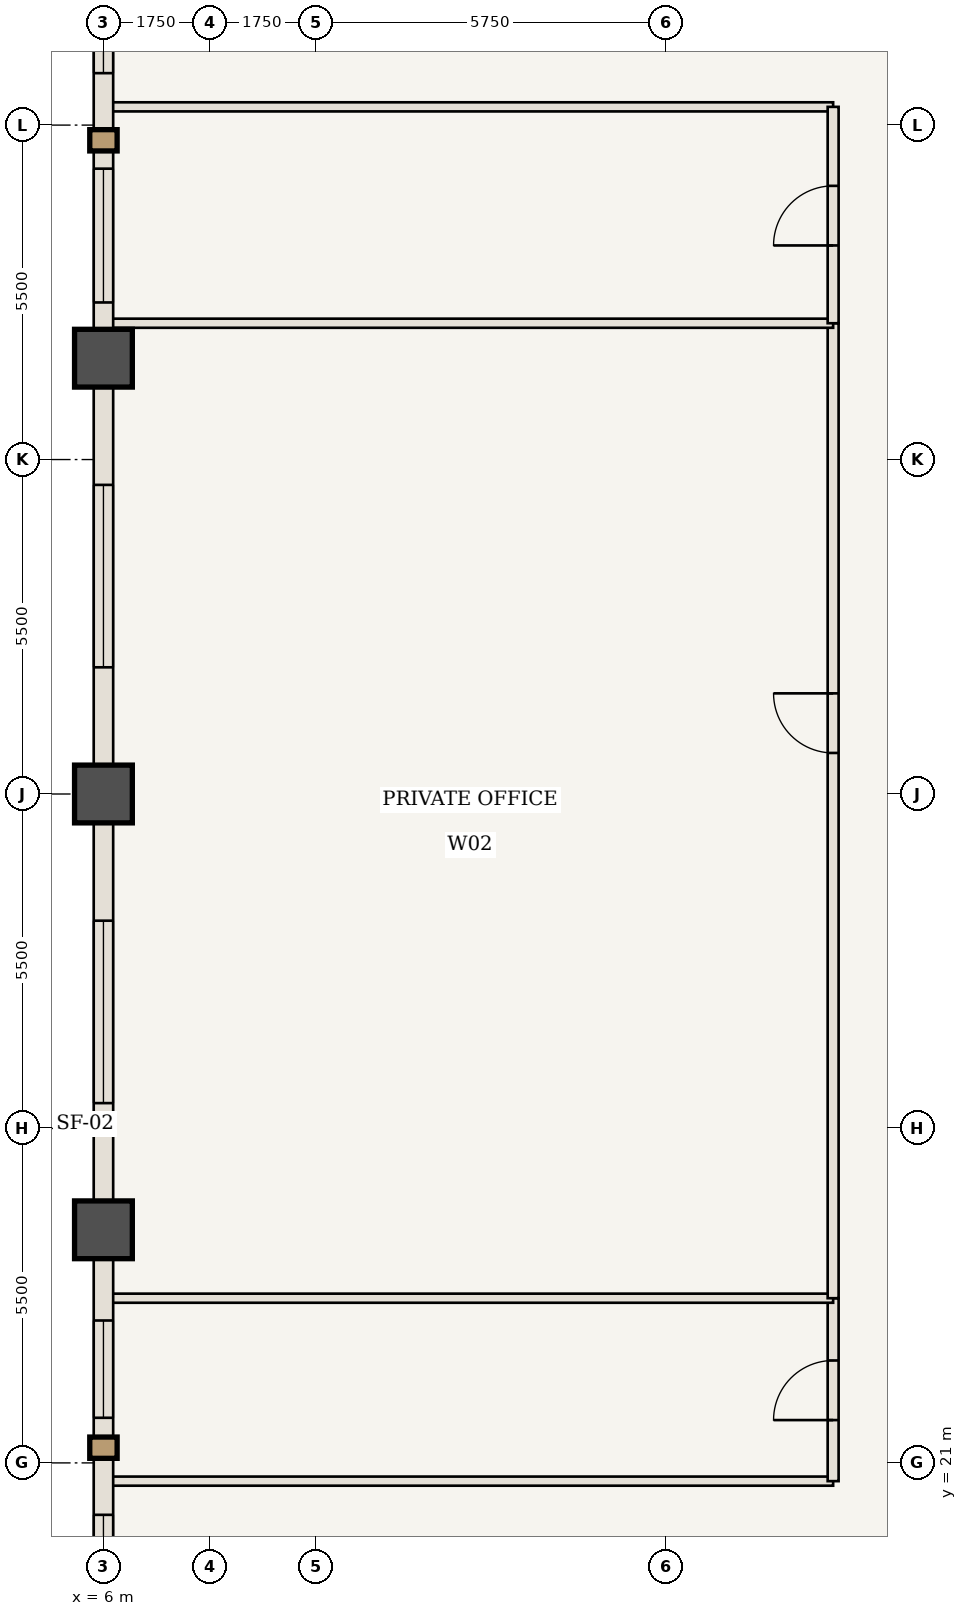
"""IFC4 building model, lengths in metres.
Left out: names, types, materials, properties, quantities, classifications, styles, units other than length and angle.
Written with IfcOpenShell. Run it as: python <this file> out.ifc"""

import sys

from ifc_helpers import new_model, si_unit, direction, frame, frame_2d, origin, origin_2d, place, context, subcontext, project, spatial, rectangle, extrude, element, fill, save


model = new_model("IFC4")
c1 = context("Model", 3, precision=1e-05, world=origin(), true_north=direction((0.0, 1.0)))
c2 = subcontext(c1, "Body", "Model", "MODEL_VIEW")
j1 = project(units=[si_unit("LENGTHUNIT", "METRE"), si_unit("PLANEANGLEUNIT", "RADIAN")], contexts=[c1])
p1 = place(None, origin())
s1 = spatial("IfcSite", under=j1, at=p1, CompositionType="ELEMENT")
p2 = place(p1, origin())
s2 = spatial("IfcBuilding", under=s1, at=p2, CompositionType="ELEMENT")
p3 = place(p2, frame((0.0, 0.0, 126.0)))
s3 = spatial("IfcBuildingStorey", under=s2, at=p3, CompositionType="ELEMENT", Elevation=126.0)
for number, where, z_axis, x_axis in (
    (1, (6.0, 24.833, 0.0), (0.0, 0.0, 1.0), (1.0, 0.0, 0.0)),
    (2, (6.0, 32.0, 0.0), (0.0, 0.0, 1.0), (1.0, 0.0, 0.0)),
    (3, (6.0, 39.167, 0.0), (0.0, 0.0, 1.0), (1.0, 0.0, 0.0)),
):
    element("IfcColumn", number, at=place(p3, frame(where, z_axis=z_axis, x_axis=x_axis)), inside=s3, PredefinedType="COLUMN", context=c2, shape_type="SweptSolid", body=[
        extrude(rectangle(XDim=0.95, YDim=0.95, at=origin_2d()), origin(), (0.0, 0.0, 1.0), 3.85),
    ])
for number, where, z_axis, x_axis in (
    (4, (6.06, 20.7, 0.0), (0.0, 0.0, 1.0), (1.0, 0.0, 0.0)),
    (5, (6.06, 43.3, 0.0), (0.0, 0.0, 1.0), (1.0, 0.0, 0.0)),
):
    element("IfcWall", number, at=place(p3, frame(where, z_axis=z_axis, x_axis=x_axis)), inside=s3, PredefinedType="STANDARD", context=c2, shape_type="SweptSolid", body=[
        extrude(rectangle(XDim=11.94, YDim=0.15, at=frame_2d((5.97, 0.0))), origin(), (0.0, 0.0, 1.0), 3.056),
    ])
p4 = place(p3, frame((18.0, 20.7, 0.0), z_axis=(0.0, 0.0, 1.0), x_axis=(0.0, 1.0, 0.0)))
e6 = element("IfcWall", 6, at=p4, inside=s3, PredefinedType="STANDARD", context=c2, shape_type="SweptSolid", body=[
    extrude(rectangle(XDim=3.008, YDim=0.18, at=frame_2d((1.504, 0.0))), origin(), (0.0, 0.0, 1.0), 3.685),
])
p5 = place(p4, frame((1.004, 0.0, 0.0)))
e7 = element("IfcOpeningElement", 7, at=p5, cuts=e6, PredefinedType="OPENING", context=c2, shape_type="SweptSolid", body=[
    extrude(rectangle(XDim=0.98, YDim=2.2, at=frame_2d((0.49, 1.1))), frame((0.0, 0.1, 0.0), z_axis=(0.0, -1.0, 0.0), x_axis=(1.0, 0.0, 0.0)), (0.0, 0.0, 1.0), 0.2),
])
p6 = place(p3, frame((6.06, 23.708, 0.0), z_axis=(0.0, 0.0, 1.0), x_axis=(1.0, 0.0, 0.0)))
e8 = element("IfcWall", 8, at=p6, inside=s3, PredefinedType="STANDARD", context=c2, shape_type="SweptSolid", body=[
    extrude(rectangle(XDim=11.94, YDim=0.15, at=frame_2d((5.97, 0.0))), origin(), (0.0, 0.0, 1.0), 3.685),
])
p7 = place(p3, frame((18.0, 23.708, 0.0), z_axis=(0.0, 0.0, 1.0), x_axis=(0.0, 1.0, 0.0)))
e9 = element("IfcWall", 9, at=p7, inside=s3, PredefinedType="STANDARD", context=c2, shape_type="SweptSolid", body=[
    extrude(rectangle(XDim=16.033, YDim=0.18, at=frame_2d((8.017, 0.0))), origin(), (0.0, 0.0, 1.0), 3.685),
])
p8 = place(p7, frame((8.967, 0.0, 0.0)))
e10 = element("IfcOpeningElement", 10, at=p8, cuts=e9, PredefinedType="OPENING", context=c2, shape_type="SweptSolid", body=[
    extrude(rectangle(XDim=0.98, YDim=2.2, at=frame_2d((0.49, 1.1))), frame((0.0, 0.1, 0.0), z_axis=(0.0, -1.0, 0.0), x_axis=(1.0, 0.0, 0.0)), (0.0, 0.0, 1.0), 0.2),
])
p9 = place(p3, frame((6.06, 39.742, 0.0), z_axis=(0.0, 0.0, 1.0), x_axis=(1.0, 0.0, 0.0)))
e11 = element("IfcWall", 11, at=p9, inside=s3, PredefinedType="STANDARD", context=c2, shape_type="SweptSolid", body=[
    extrude(rectangle(XDim=11.94, YDim=0.15, at=frame_2d((5.97, 0.0))), origin(), (0.0, 0.0, 1.0), 3.685),
])
p10 = place(p3, frame((18.0, 39.742, 0.0), z_axis=(0.0, 0.0, 1.0), x_axis=(0.0, 1.0, 0.0)))
e12 = element("IfcWall", 12, at=p10, inside=s3, PredefinedType="STANDARD", context=c2, shape_type="SweptSolid", body=[
    extrude(rectangle(XDim=3.558, YDim=0.18, at=frame_2d((1.779, 0.0))), origin(), (0.0, 0.0, 1.0), 3.685),
])
p11 = place(p10, frame((1.279, 0.0, 0.0)))
e13 = element("IfcOpeningElement", 13, at=p11, cuts=e12, PredefinedType="OPENING", context=c2, shape_type="SweptSolid", body=[
    extrude(rectangle(XDim=0.98, YDim=2.2, at=frame_2d((0.49, 1.1))), frame((0.0, 0.1, 0.0), z_axis=(0.0, -1.0, 0.0), x_axis=(1.0, 0.0, 0.0)), (0.0, 0.0, 1.0), 0.2),
])
p12 = place(p3, frame((6.0, 17.667, 0.0), z_axis=(0.0, 0.0, 1.0), x_axis=(0.0, 1.0, 0.0)))
e14 = element("IfcWall", 14, at=p12, inside=s3, PredefinedType="USERDEFINED", context=c2, shape_type="SweptSolid", body=[
    extrude(rectangle(XDim=7.167, YDim=0.32, at=frame_2d((3.583, 0.0))), origin(), (0.0, 0.0, 1.0), 2.885),
])
p13 = place(p12, frame((0.879, 0.0, 0.85)))
e15 = element("IfcOpeningElement", 15, at=p13, cuts=e14, PredefinedType="OPENING", context=c2, shape_type="SweptSolid", body=[
    extrude(rectangle(XDim=1.6, YDim=1.835, at=frame_2d((0.8, 0.917))), frame((0.0, 0.17, 0.0), z_axis=(0.0, -1.0, 0.0), x_axis=(1.0, 0.0, 0.0)), (0.0, 0.0, 1.0), 0.34),
])
p14 = place(p12, frame((4.075, 0.0, 0.85)))
e16 = element("IfcOpeningElement", 16, at=p14, cuts=e14, PredefinedType="OPENING", context=c2, shape_type="SweptSolid", body=[
    extrude(rectangle(XDim=1.6, YDim=1.835, at=frame_2d((0.8, 0.917))), frame((0.0, 0.17, 0.0), z_axis=(0.0, -1.0, 0.0), x_axis=(1.0, 0.0, 0.0)), (0.0, 0.0, 1.0), 0.34),
])
p15 = place(p3, frame((6.0, 24.833, 0.0), z_axis=(0.0, 0.0, 1.0), x_axis=(0.0, 1.0, 0.0)))
e17 = element("IfcWall", 17, at=p15, inside=s3, PredefinedType="USERDEFINED", context=c2, shape_type="SweptSolid", body=[
    extrude(rectangle(XDim=7.167, YDim=0.32, at=frame_2d((3.583, 0.0))), origin(), (0.0, 0.0, 1.0), 2.885),
])
p16 = place(p15, frame((2.083, 0.0, 0.85)))
e18 = element("IfcOpeningElement", 18, at=p16, cuts=e17, PredefinedType="OPENING", context=c2, shape_type="SweptSolid", body=[
    extrude(rectangle(XDim=3.0, YDim=1.835, at=frame_2d((1.5, 0.917))), frame((0.0, 0.17, 0.0), z_axis=(0.0, -1.0, 0.0), x_axis=(1.0, 0.0, 0.0)), (0.0, 0.0, 1.0), 0.34),
])
p17 = place(p3, frame((6.0, 32.0, 0.0), z_axis=(0.0, 0.0, 1.0), x_axis=(0.0, 1.0, 0.0)))
e19 = element("IfcWall", 19, at=p17, inside=s3, PredefinedType="USERDEFINED", context=c2, shape_type="SweptSolid", body=[
    extrude(rectangle(XDim=7.167, YDim=0.32, at=frame_2d((3.583, 0.0))), origin(), (0.0, 0.0, 1.0), 2.885),
])
p18 = place(p17, frame((2.083, 0.0, 0.85)))
e20 = element("IfcOpeningElement", 20, at=p18, cuts=e19, PredefinedType="OPENING", context=c2, shape_type="SweptSolid", body=[
    extrude(rectangle(XDim=3.0, YDim=1.835, at=frame_2d((1.5, 0.917))), frame((0.0, 0.17, 0.0), z_axis=(0.0, -1.0, 0.0), x_axis=(1.0, 0.0, 0.0)), (0.0, 0.0, 1.0), 0.34),
])
p19 = place(p3, frame((6.0, 39.167, 0.0), z_axis=(0.0, 0.0, 1.0), x_axis=(0.0, 1.0, 0.0)))
e21 = element("IfcWall", 21, at=p19, inside=s3, PredefinedType="USERDEFINED", context=c2, shape_type="SweptSolid", body=[
    extrude(rectangle(XDim=7.167, YDim=0.32, at=frame_2d((3.583, 0.0))), origin(), (0.0, 0.0, 1.0), 2.885),
])
p20 = place(p19, frame((0.917, 0.0, 0.85)))
e22 = element("IfcOpeningElement", 22, at=p20, cuts=e21, PredefinedType="OPENING", context=c2, shape_type="SweptSolid", body=[
    extrude(rectangle(XDim=2.2, YDim=1.835, at=frame_2d((1.1, 0.917))), frame((0.0, 0.17, 0.0), z_axis=(0.0, -1.0, 0.0), x_axis=(1.0, 0.0, 0.0)), (0.0, 0.0, 1.0), 0.34),
])
p21 = place(p19, frame((4.688, 0.0, 0.85)))
e23 = element("IfcOpeningElement", 23, at=p21, cuts=e21, PredefinedType="OPENING", context=c2, shape_type="SweptSolid", body=[
    extrude(rectangle(XDim=1.6, YDim=1.835, at=frame_2d((0.8, 0.917))), frame((0.0, 0.17, 0.0), z_axis=(0.0, -1.0, 0.0), x_axis=(1.0, 0.0, 0.0)), (0.0, 0.0, 1.0), 0.34),
])
p22 = place(p5, origin())
e24 = element("IfcDoor", 24, at=p22, inside=s3, OperationType="SINGLE_SWING_LEFT", PredefinedType="DOOR", context=c2, shape_type="SweptSolid", body=[
    extrude(rectangle(XDim=0.98, YDim=2.2, at=frame_2d((0.49, 1.1))), frame((0.0, 0.025, 0.0), z_axis=(0.0, -1.0, 0.0), x_axis=(1.0, 0.0, 0.0)), (0.0, 0.0, 1.0), 0.05),
])
fill(e7, e24)
p23 = place(p8, origin())
e25 = element("IfcDoor", 25, at=p23, inside=s3, OperationType="SINGLE_SWING_RIGHT", PredefinedType="DOOR", context=c2, shape_type="SweptSolid", body=[
    extrude(rectangle(XDim=0.98, YDim=2.2, at=frame_2d((0.49, 1.1))), frame((0.0, 0.025, 0.0), z_axis=(0.0, -1.0, 0.0), x_axis=(1.0, 0.0, 0.0)), (0.0, 0.0, 1.0), 0.05),
])
fill(e10, e25)
p24 = place(p11, origin())
e26 = element("IfcDoor", 26, at=p24, inside=s3, OperationType="SINGLE_SWING_LEFT", PredefinedType="DOOR", context=c2, shape_type="SweptSolid", body=[
    extrude(rectangle(XDim=0.98, YDim=2.2, at=frame_2d((0.49, 1.1))), frame((0.0, 0.025, 0.0), z_axis=(0.0, -1.0, 0.0), x_axis=(1.0, 0.0, 0.0)), (0.0, 0.0, 1.0), 0.05),
])
fill(e13, e26)
p25 = place(p13, origin())
e27 = element("IfcWindow", 27, at=p25, inside=s3, PartitioningType="SINGLE_PANEL", PredefinedType="WINDOW", context=c2, shape_type="SweptSolid", body=[
    extrude(rectangle(XDim=1.6, YDim=1.835, at=frame_2d((0.8, 0.917))), frame((0.0, 0.03, 0.0), z_axis=(0.0, -1.0, 0.0), x_axis=(1.0, 0.0, 0.0)), (0.0, 0.0, 1.0), 0.06),
])
fill(e15, e27)
p26 = place(p14, origin())
e28 = element("IfcWindow", 28, at=p26, inside=s3, PartitioningType="SINGLE_PANEL", PredefinedType="WINDOW", context=c2, shape_type="SweptSolid", body=[
    extrude(rectangle(XDim=1.6, YDim=1.835, at=frame_2d((0.8, 0.917))), frame((0.0, 0.03, 0.0), z_axis=(0.0, -1.0, 0.0), x_axis=(1.0, 0.0, 0.0)), (0.0, 0.0, 1.0), 0.06),
])
fill(e16, e28)
p27 = place(p16, origin())
e29 = element("IfcWindow", 29, at=p27, inside=s3, PartitioningType="SINGLE_PANEL", PredefinedType="WINDOW", context=c2, shape_type="SweptSolid", body=[
    extrude(rectangle(XDim=3.0, YDim=1.835, at=frame_2d((1.5, 0.917))), frame((0.0, 0.03, 0.0), z_axis=(0.0, -1.0, 0.0), x_axis=(1.0, 0.0, 0.0)), (0.0, 0.0, 1.0), 0.06),
])
fill(e18, e29)
p28 = place(p18, origin())
e30 = element("IfcWindow", 30, at=p28, inside=s3, PartitioningType="SINGLE_PANEL", PredefinedType="WINDOW", context=c2, shape_type="SweptSolid", body=[
    extrude(rectangle(XDim=3.0, YDim=1.835, at=frame_2d((1.5, 0.917))), frame((0.0, 0.03, 0.0), z_axis=(0.0, -1.0, 0.0), x_axis=(1.0, 0.0, 0.0)), (0.0, 0.0, 1.0), 0.06),
])
fill(e20, e30)
p29 = place(p20, origin())
e31 = element("IfcWindow", 31, at=p29, inside=s3, PartitioningType="SINGLE_PANEL", PredefinedType="WINDOW", context=c2, shape_type="SweptSolid", body=[
    extrude(rectangle(XDim=2.2, YDim=1.835, at=frame_2d((1.1, 0.917))), frame((0.0, 0.03, 0.0), z_axis=(0.0, -1.0, 0.0), x_axis=(1.0, 0.0, 0.0)), (0.0, 0.0, 1.0), 0.06),
])
fill(e22, e31)
p30 = place(p21, origin())
e32 = element("IfcWindow", 32, at=p30, inside=s3, PartitioningType="SINGLE_PANEL", PredefinedType="WINDOW", context=c2, shape_type="SweptSolid", body=[
    extrude(rectangle(XDim=1.6, YDim=1.835, at=frame_2d((0.8, 0.917))), frame((0.0, 0.03, 0.0), z_axis=(0.0, -1.0, 0.0), x_axis=(1.0, 0.0, 0.0)), (0.0, 0.0, 1.0), 0.06),
])
fill(e23, e32)
save(model, sys.argv[1])
